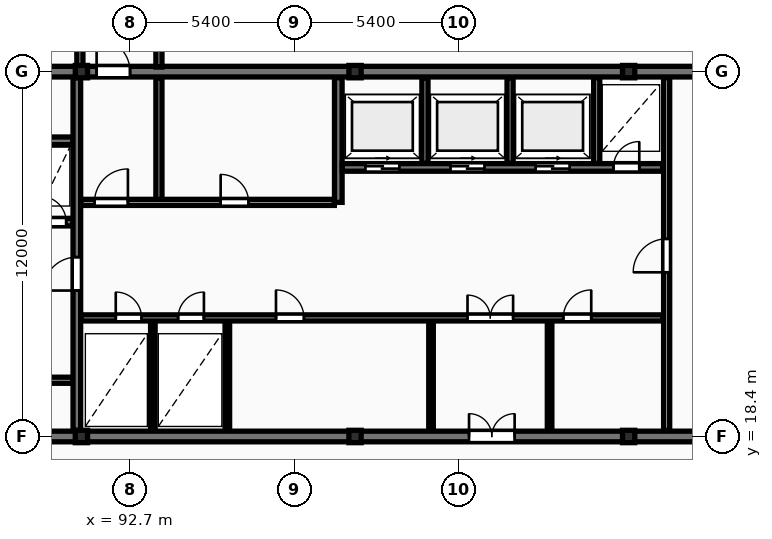
"""IFC4 building model, lengths in metres.
Left out: names, types, materials, properties, quantities, classifications, styles, units other than length and angle.
Written with IfcOpenShell. Run it as: python <this file> out.ifc"""

import sys

from ifc_helpers import new_model, si_unit, direction, frame, frame_2d, origin, origin_2d, place, context, subcontext, project, spatial, rectangle, i_section, extrude, element, fill, save


model = new_model("IFC4")
c1 = context("Model", 3, precision=1e-05, world=origin(), true_north=direction((0.0, 1.0)))
c2 = subcontext(c1, "Body", "Model", "MODEL_VIEW")
j1 = project(units=[si_unit("LENGTHUNIT", "METRE"), si_unit("PLANEANGLEUNIT", "RADIAN")], contexts=[c1])
p1 = place(None, origin())
s1 = spatial("IfcSite", under=j1, at=p1, CompositionType="ELEMENT")
p2 = place(p1, origin())
s2 = spatial("IfcBuilding", under=s1, at=p2, CompositionType="ELEMENT")
p3 = place(p2, frame((0.0, 0.0, 142.9)))
s3 = spatial("IfcBuildingStorey", under=s2, at=p3, CompositionType="ELEMENT", Elevation=142.9)
for number, where, z_axis, x_axis in (
    (1, (91.1, 18.4, 0.0), (0.0, 0.0, 1.0), (1.0, 0.0, 0.0)),
    (2, (91.1, 30.4, 0.0), (0.0, 0.0, 1.0), (1.0, 0.0, 0.0)),
    (3, (100.1, 18.4, 0.0), (0.0, 0.0, 1.0), (1.0, 0.0, 0.0)),
    (4, (100.1, 30.4, 0.0), (0.0, 0.0, 1.0), (1.0, 0.0, 0.0)),
    (5, (109.1, 18.4, 0.0), (0.0, 0.0, 1.0), (1.0, 0.0, 0.0)),
    (6, (109.1, 30.4, 0.0), (0.0, 0.0, 1.0), (1.0, 0.0, 0.0)),
):
    element("IfcColumn", number, at=place(p3, frame(where, z_axis=z_axis, x_axis=x_axis)), inside=s3, PredefinedType="COLUMN", context=c2, shape_type="SweptSolid", body=[
        extrude(i_section(OverallWidth=0.403, OverallDepth=0.406, WebThickness=0.027, FlangeThickness=0.043, FilletRadius=0.015, at=origin_2d()), origin(), (0.0, 0.0, 1.0), 3.6),
    ])
p4 = place(p3, frame((81.925, 30.4, 0.0), z_axis=(0.0, 0.0, 1.0), x_axis=(1.0, 0.0, 0.0)))
e7 = element("IfcWall", 7, at=p4, inside=s3, PredefinedType="SHEAR", context=c2, shape_type="SweptSolid", body=[
    extrude(rectangle(XDim=36.265, YDim=0.35, at=frame_2d((18.132, 0.0))), origin(), (0.0, 0.0, 1.0), 3.6),
])
p5 = place(p4, frame((9.675, 0.0, 0.0)))
e8 = element("IfcOpeningElement", 8, at=p5, cuts=e7, PredefinedType="OPENING", context=c2, shape_type="SweptSolid", body=[
    extrude(rectangle(XDim=1.1, YDim=2.1, at=frame_2d((0.55, 1.05))), frame((0.0, 0.185, 0.0), z_axis=(0.0, -1.0, 0.0), x_axis=(1.0, 0.0, 0.0)), (0.0, 0.0, 1.0), 0.37),
])
p6 = place(p3, frame((81.925, 18.4, 0.0), z_axis=(0.0, 0.0, 1.0), x_axis=(1.0, 0.0, 0.0)))
e9 = element("IfcWall", 9, at=p6, inside=s3, PredefinedType="SHEAR", context=c2, shape_type="SweptSolid", body=[
    extrude(rectangle(XDim=36.265, YDim=0.35, at=frame_2d((18.132, 0.0))), origin(), (0.0, 0.0, 1.0), 3.6),
])
p7 = place(p6, frame((5.675, 0.0, 0.0)))
e10 = element("IfcOpeningElement", 10, at=p7, cuts=e9, PredefinedType="OPENING", context=c2, shape_type="SweptSolid", body=[
    extrude(rectangle(XDim=1.0, YDim=2.15, at=frame_2d((0.5, 1.075))), frame((0.0, 0.185, 0.0), z_axis=(0.0, -1.0, 0.0), x_axis=(1.0, 0.0, 0.0)), (0.0, 0.0, 1.0), 0.37),
])
p8 = place(p6, frame((21.925, 0.0, 0.0)))
e11 = element("IfcOpeningElement", 11, at=p8, cuts=e9, PredefinedType="OPENING", context=c2, shape_type="SweptSolid", body=[
    extrude(rectangle(XDim=1.5, YDim=2.2, at=frame_2d((0.75, 1.1))), frame((0.0, 0.185, 0.0), z_axis=(0.0, -1.0, 0.0), x_axis=(1.0, 0.0, 0.0)), (0.0, 0.0, 1.0), 0.37),
])
p9 = place(p6, frame((29.875, 0.0, 0.0)))
e12 = element("IfcOpeningElement", 12, at=p9, cuts=e9, PredefinedType="OPENING", context=c2, shape_type="SweptSolid", body=[
    extrude(rectangle(XDim=1.0, YDim=2.15, at=frame_2d((0.5, 1.075))), frame((0.0, 0.185, 0.0), z_axis=(0.0, -1.0, 0.0), x_axis=(1.0, 0.0, 0.0)), (0.0, 0.0, 1.0), 0.37),
])
p10 = place(p3, frame((83.0, 28.125, 0.0), z_axis=(0.0, 0.0, 1.0), x_axis=(1.0, 0.0, 0.0)))
e13 = element("IfcWall", 13, at=p10, inside=s3, PredefinedType="SHEAR", context=c2, shape_type="SweptSolid", body=[
    extrude(rectangle(XDim=7.82, YDim=0.25, at=frame_2d((3.91, 0.0))), origin(), (0.0, 0.0, 1.0), 3.6),
])
p11 = place(p3, frame((86.5, 25.45, 0.0), z_axis=(0.0, 0.0, 1.0), x_axis=(1.0, 0.0, 0.0)))
e14 = element("IfcWall", 14, at=p11, inside=s3, PredefinedType="SHEAR", context=c2, shape_type="SweptSolid", body=[
    extrude(rectangle(XDim=4.32, YDim=0.25, at=frame_2d((2.16, 0.0))), origin(), (0.0, 0.0, 1.0), 3.6),
])
p12 = place(p11, frame((1.14, 0.0, 0.0)))
e15 = element("IfcOpeningElement", 15, at=p12, cuts=e14, PredefinedType="OPENING", context=c2, shape_type="SweptSolid", body=[
    extrude(rectangle(XDim=1.12, YDim=2.12, at=frame_2d((0.56, 1.06))), frame((0.0, 0.135, 0.0), z_axis=(0.0, -1.0, 0.0), x_axis=(1.0, 0.0, 0.0)), (0.0, 0.0, 1.0), 0.27),
])
p13 = place(p11, frame((3.25, 0.0, 0.0)))
e16 = element("IfcOpeningElement", 16, at=p13, cuts=e14, PredefinedType="OPENING", context=c2, shape_type="SweptSolid", body=[
    extrude(rectangle(XDim=0.85, YDim=2.05, at=frame_2d((0.425, 1.025))), frame((0.0, 0.135, 0.0), z_axis=(0.0, -1.0, 0.0), x_axis=(1.0, 0.0, 0.0)), (0.0, 0.0, 1.0), 0.27),
])
p14 = place(p3, frame((86.5, 20.25, 0.0), z_axis=(0.0, 0.0, 1.0), x_axis=(1.0, 0.0, 0.0)))
e17 = element("IfcWall", 17, at=p14, inside=s3, PredefinedType="PARTITIONING", context=c2, shape_type="SweptSolid", body=[
    extrude(rectangle(XDim=4.32, YDim=0.2, at=frame_2d((2.16, 0.0))), origin(), (0.0, 0.0, 1.0), 3.31),
])
p15 = place(p14, frame((1.4, 0.0, 0.0)))
e18 = element("IfcOpeningElement", 18, at=p15, cuts=e17, PredefinedType="OPENING", context=c2, shape_type="SweptSolid", body=[
    extrude(rectangle(XDim=1.1, YDim=2.1, at=frame_2d((0.55, 1.05))), frame((0.0, 0.11, 0.0), z_axis=(0.0, -1.0, 0.0), x_axis=(1.0, 0.0, 0.0)), (0.0, 0.0, 1.0), 0.22),
])
p16 = place(p3, frame((90.95, 18.6, 0.0), z_axis=(0.0, 0.0, 1.0), x_axis=(0.0, 1.0, 0.0)))
e19 = element("IfcWall", 19, at=p16, inside=s3, PredefinedType="SHEAR", context=c2, shape_type="SweptSolid", body=[
    extrude(rectangle(XDim=11.6, YDim=0.25, at=frame_2d((5.8, 0.0))), origin(), (0.0, 0.0, 1.0), 3.6),
])
p17 = place(p16, frame((4.6, 0.0, 0.0)))
e20 = element("IfcOpeningElement", 20, at=p17, cuts=e19, PredefinedType="OPENING", context=c2, shape_type="SweptSolid", body=[
    extrude(rectangle(XDim=1.1, YDim=2.1, at=frame_2d((0.55, 1.05))), frame((0.0, 0.135, 0.0), z_axis=(0.0, -1.0, 0.0), x_axis=(1.0, 0.0, 0.0)), (0.0, 0.0, 1.0), 0.27),
])
p18 = place(p3, frame((93.65, 26.1, 0.0), z_axis=(0.0, 0.0, 1.0), x_axis=(0.0, 1.0, 0.0)))
e21 = element("IfcWall", 21, at=p18, inside=s3, PredefinedType="PARTITIONING", context=c2, shape_type="SweptSolid", body=[
    extrude(rectangle(XDim=4.1, YDim=0.2, at=frame_2d((2.05, 0.0))), origin(), (0.0, 0.0, 1.0), 3.31),
])
p19 = place(p3, frame((91.08, 26.1, 0.0), z_axis=(0.0, 0.0, 1.0), x_axis=(1.0, 0.0, 0.0)))
e22 = element("IfcWall", 22, at=p19, inside=s3, PredefinedType="PARTITIONING", context=c2, shape_type="SweptSolid", body=[
    extrude(rectangle(XDim=8.34, YDim=0.2, at=frame_2d((4.17, 0.0))), origin(), (0.0, 0.0, 1.0), 3.31),
])
p20 = place(p19, frame((0.45, 0.0, 0.0)))
e23 = element("IfcOpeningElement", 23, at=p20, cuts=e22, PredefinedType="OPENING", context=c2, shape_type="SweptSolid", body=[
    extrude(rectangle(XDim=1.1, YDim=2.1, at=frame_2d((0.55, 1.05))), frame((0.0, 0.11, 0.0), z_axis=(0.0, -1.0, 0.0), x_axis=(1.0, 0.0, 0.0)), (0.0, 0.0, 1.0), 0.22),
])
p21 = place(p19, frame((4.6, 0.0, 0.0)))
e24 = element("IfcOpeningElement", 24, at=p21, cuts=e22, PredefinedType="OPENING", context=c2, shape_type="SweptSolid", body=[
    extrude(rectangle(XDim=0.92, YDim=2.08, at=frame_2d((0.46, 1.04))), frame((0.0, 0.11, 0.0), z_axis=(0.0, -1.0, 0.0), x_axis=(1.0, 0.0, 0.0)), (0.0, 0.0, 1.0), 0.22),
])
p22 = place(p3, frame((99.55, 26.1, 0.0), z_axis=(0.0, 0.0, 1.0), x_axis=(0.0, 1.0, 0.0)))
e25 = element("IfcWall", 25, at=p22, inside=s3, PredefinedType="SHEAR", context=c2, shape_type="SweptSolid", body=[
    extrude(rectangle(XDim=4.1, YDim=0.25, at=frame_2d((2.05, 0.0))), origin(), (0.0, 0.0, 1.0), 3.6),
])
for number, where, z_axis, x_axis in (
    (26, (102.4, 27.38, 0.0), (0.0, 0.0, 1.0), (0.0, 1.0, 0.0)),
    (27, (105.2, 27.38, 0.0), (0.0, 0.0, 1.0), (0.0, 1.0, 0.0)),
    (28, (108.05, 27.38, 0.0), (0.0, 0.0, 1.0), (0.0, 1.0, 0.0)),
):
    element("IfcWall", number, at=place(p3, frame(where, z_axis=z_axis, x_axis=x_axis)), inside=s3, PredefinedType="PARTITIONING", context=c2, shape_type="SweptSolid", body=[
        extrude(rectangle(XDim=2.82, YDim=0.2, at=frame_2d((1.41, 0.0))), origin(), (0.0, 0.0, 1.0), 3.31),
    ])
p23 = place(p3, frame((99.68, 27.25, 0.0), z_axis=(0.0, 0.0, 1.0), x_axis=(1.0, 0.0, 0.0)))
e29 = element("IfcWall", 29, at=p23, inside=s3, PredefinedType="SHEAR", context=c2, shape_type="SweptSolid", body=[
    extrude(rectangle(XDim=10.54, YDim=0.25, at=frame_2d((5.27, 0.0))), origin(), (0.0, 0.0, 1.0), 3.6),
])
p24 = place(p23, frame((0.76, 0.0, 0.0)))
e30 = element("IfcOpeningElement", 30, at=p24, cuts=e29, PredefinedType="OPENING", context=c2, shape_type="SweptSolid", body=[
    extrude(rectangle(XDim=1.12, YDim=2.12, at=frame_2d((0.56, 1.06))), frame((0.0, 0.135, 0.0), z_axis=(0.0, -1.0, 0.0), x_axis=(1.0, 0.0, 0.0)), (0.0, 0.0, 1.0), 0.27),
])
p25 = place(p23, frame((3.56, 0.0, 0.0)))
e31 = element("IfcOpeningElement", 31, at=p25, cuts=e29, PredefinedType="OPENING", context=c2, shape_type="SweptSolid", body=[
    extrude(rectangle(XDim=1.12, YDim=2.12, at=frame_2d((0.56, 1.06))), frame((0.0, 0.135, 0.0), z_axis=(0.0, -1.0, 0.0), x_axis=(1.0, 0.0, 0.0)), (0.0, 0.0, 1.0), 0.27),
])
p26 = place(p23, frame((6.36, 0.0, 0.0)))
e32 = element("IfcOpeningElement", 32, at=p26, cuts=e29, PredefinedType="OPENING", context=c2, shape_type="SweptSolid", body=[
    extrude(rectangle(XDim=1.12, YDim=2.12, at=frame_2d((0.56, 1.06))), frame((0.0, 0.135, 0.0), z_axis=(0.0, -1.0, 0.0), x_axis=(1.0, 0.0, 0.0)), (0.0, 0.0, 1.0), 0.27),
])
p27 = place(p23, frame((8.92, 0.0, 0.0)))
e33 = element("IfcOpeningElement", 33, at=p27, cuts=e29, PredefinedType="OPENING", context=c2, shape_type="SweptSolid", body=[
    extrude(rectangle(XDim=0.85, YDim=2.05, at=frame_2d((0.425, 1.025))), frame((0.0, 0.135, 0.0), z_axis=(0.0, -1.0, 0.0), x_axis=(1.0, 0.0, 0.0)), (0.0, 0.0, 1.0), 0.27),
])
for number, where, z_axis, x_axis in (
    (34, (93.45, 18.6, 0.0), (0.0, 0.0, 1.0), (0.0, 1.0, 0.0)),
    (35, (95.9, 18.6, 0.0), (0.0, 0.0, 1.0), (0.0, 1.0, 0.0)),
    (36, (102.6, 18.6, 0.0), (0.0, 0.0, 1.0), (0.0, 1.0, 0.0)),
    (37, (106.5, 18.6, 0.0), (0.0, 0.0, 1.0), (0.0, 1.0, 0.0)),
):
    element("IfcWall", number, at=place(p3, frame(where, z_axis=z_axis, x_axis=x_axis)), inside=s3, PredefinedType="PARTITIONING", context=c2, shape_type="SweptSolid", body=[
        extrude(rectangle(XDim=3.6, YDim=0.15, at=frame_2d((1.8, 0.0))), origin(), (0.0, 0.0, 1.0), 3.31),
    ])
p28 = place(p3, frame((91.08, 22.3, 0.0), z_axis=(0.0, 0.0, 1.0), x_axis=(1.0, 0.0, 0.0)))
e38 = element("IfcWall", 38, at=p28, inside=s3, PredefinedType="PARTITIONING", context=c2, shape_type="SweptSolid", body=[
    extrude(rectangle(XDim=19.14, YDim=0.2, at=frame_2d((9.57, 0.0))), origin(), (0.0, 0.0, 1.0), 3.31),
])
p29 = place(p28, frame((1.15, 0.0, 0.0)))
e39 = element("IfcOpeningElement", 39, at=p29, cuts=e38, PredefinedType="OPENING", context=c2, shape_type="SweptSolid", body=[
    extrude(rectangle(XDim=0.85, YDim=2.05, at=frame_2d((0.425, 1.025))), frame((0.0, 0.11, 0.0), z_axis=(0.0, -1.0, 0.0), x_axis=(1.0, 0.0, 0.0)), (0.0, 0.0, 1.0), 0.22),
])
p30 = place(p28, frame((3.2, 0.0, 0.0)))
e40 = element("IfcOpeningElement", 40, at=p30, cuts=e38, PredefinedType="OPENING", context=c2, shape_type="SweptSolid", body=[
    extrude(rectangle(XDim=0.85, YDim=2.05, at=frame_2d((0.425, 1.025))), frame((0.0, 0.11, 0.0), z_axis=(0.0, -1.0, 0.0), x_axis=(1.0, 0.0, 0.0)), (0.0, 0.0, 1.0), 0.22),
])
p31 = place(p28, frame((12.72, 0.0, 0.0)))
e41 = element("IfcOpeningElement", 41, at=p31, cuts=e38, PredefinedType="OPENING", context=c2, shape_type="SweptSolid", body=[
    extrude(rectangle(XDim=1.5, YDim=2.2, at=frame_2d((0.75, 1.1))), frame((0.0, 0.11, 0.0), z_axis=(0.0, -1.0, 0.0), x_axis=(1.0, 0.0, 0.0)), (0.0, 0.0, 1.0), 0.22),
])
p32 = place(p28, frame((6.42, 0.0, 0.0)))
e42 = element("IfcOpeningElement", 42, at=p32, cuts=e38, PredefinedType="OPENING", context=c2, shape_type="SweptSolid", body=[
    extrude(rectangle(XDim=0.92, YDim=2.08, at=frame_2d((0.46, 1.04))), frame((0.0, 0.11, 0.0), z_axis=(0.0, -1.0, 0.0), x_axis=(1.0, 0.0, 0.0)), (0.0, 0.0, 1.0), 0.22),
])
p33 = place(p28, frame((15.87, 0.0, 0.0)))
e43 = element("IfcOpeningElement", 43, at=p33, cuts=e38, PredefinedType="OPENING", context=c2, shape_type="SweptSolid", body=[
    extrude(rectangle(XDim=0.92, YDim=2.08, at=frame_2d((0.46, 1.04))), frame((0.0, 0.11, 0.0), z_axis=(0.0, -1.0, 0.0), x_axis=(1.0, 0.0, 0.0)), (0.0, 0.0, 1.0), 0.22),
])
p34 = place(p3, frame((110.35, 18.6, 0.0), z_axis=(0.0, 0.0, 1.0), x_axis=(0.0, 1.0, 0.0)))
e44 = element("IfcWall", 44, at=p34, inside=s3, PredefinedType="PARTITIONING", context=c2, shape_type="SweptSolid", body=[
    extrude(rectangle(XDim=11.6, YDim=0.2, at=frame_2d((5.8, 0.0))), origin(), (0.0, 0.0, 1.0), 3.31),
])
p35 = place(p34, frame((5.2, 0.0, 0.0)))
e45 = element("IfcOpeningElement", 45, at=p35, cuts=e44, PredefinedType="OPENING", context=c2, shape_type="SweptSolid", body=[
    extrude(rectangle(XDim=1.1, YDim=2.15, at=frame_2d((0.55, 1.075))), frame((0.0, 0.11, 0.0), z_axis=(0.0, -1.0, 0.0), x_axis=(1.0, 0.0, 0.0)), (0.0, 0.0, 1.0), 0.22),
])
p36 = place(p3, frame((91.05, 30.55, 0.0), z_axis=(0.0, 0.0, 1.0), x_axis=(0.0, 1.0, 0.0)))
e46 = element("IfcWall", 46, at=p36, inside=s3, PredefinedType="PARTITIONING", context=c2, shape_type="SweptSolid", body=[
    extrude(rectangle(XDim=2.2, YDim=0.2, at=frame_2d((1.1, 0.0))), origin(), (0.0, 0.0, 1.0), 3.31),
])
p37 = place(p3, frame((93.65, 30.55, 0.0), z_axis=(0.0, 0.0, 1.0), x_axis=(0.0, 1.0, 0.0)))
e47 = element("IfcWall", 47, at=p37, inside=s3, PredefinedType="PARTITIONING", context=c2, shape_type="SweptSolid", body=[
    extrude(rectangle(XDim=2.2, YDim=0.2, at=frame_2d((1.1, 0.0))), origin(), (0.0, 0.0, 1.0), 2.384),
])
p38 = place(p5, origin())
e48 = element("IfcDoor", 48, at=p38, inside=s3, OperationType="SINGLE_SWING_LEFT", PredefinedType="DOOR", context=c2, shape_type="SweptSolid", body=[
    extrude(rectangle(XDim=1.1, YDim=2.1, at=frame_2d((0.55, 1.05))), frame((0.0, 0.025, 0.0), z_axis=(0.0, -1.0, 0.0), x_axis=(1.0, 0.0, 0.0)), (0.0, 0.0, 1.0), 0.05),
])
fill(e8, e48)
p39 = place(p8, origin())
e49 = element("IfcDoor", 49, at=p39, inside=s3, OperationType="DOUBLE_DOOR_SINGLE_SWING", PredefinedType="DOOR", context=c2, shape_type="SweptSolid", body=[
    extrude(rectangle(XDim=1.5, YDim=2.2, at=frame_2d((0.75, 1.1))), frame((0.0, 0.025, 0.0), z_axis=(0.0, -1.0, 0.0), x_axis=(1.0, 0.0, 0.0)), (0.0, 0.0, 1.0), 0.05),
])
fill(e11, e49)
p40 = place(p13, origin())
e50 = element("IfcDoor", 50, at=p40, inside=s3, OperationType="SINGLE_SWING_LEFT", PredefinedType="DOOR", context=c2, shape_type="SweptSolid", body=[
    extrude(rectangle(XDim=0.85, YDim=2.05, at=frame_2d((0.425, 1.025))), frame((0.0, 0.025, 0.0), z_axis=(0.0, -1.0, 0.0), x_axis=(1.0, 0.0, 0.0)), (0.0, 0.0, 1.0), 0.05),
])
fill(e16, e50)
p41 = place(p17, origin())
e51 = element("IfcDoor", 51, at=p41, inside=s3, OperationType="SINGLE_SWING_LEFT", PredefinedType="DOOR", context=c2, shape_type="SweptSolid", body=[
    extrude(rectangle(XDim=1.1, YDim=2.1, at=frame_2d((0.55, 1.05))), frame((0.0, 0.025, 0.0), z_axis=(0.0, -1.0, 0.0), x_axis=(1.0, 0.0, 0.0)), (0.0, 0.0, 1.0), 0.05),
])
fill(e20, e51)
p42 = place(p20, origin())
e52 = element("IfcDoor", 52, at=p42, inside=s3, OperationType="SINGLE_SWING_RIGHT", PredefinedType="DOOR", context=c2, shape_type="SweptSolid", body=[
    extrude(rectangle(XDim=1.1, YDim=2.1, at=frame_2d((0.55, 1.05))), frame((0.0, 0.025, 0.0), z_axis=(0.0, -1.0, 0.0), x_axis=(1.0, 0.0, 0.0)), (0.0, 0.0, 1.0), 0.05),
])
fill(e23, e52)
p43 = place(p21, origin())
e53 = element("IfcDoor", 53, at=p43, inside=s3, OperationType="SINGLE_SWING_LEFT", PredefinedType="DOOR", context=c2, shape_type="SweptSolid", body=[
    extrude(rectangle(XDim=0.92, YDim=2.08, at=frame_2d((0.46, 1.04))), frame((0.0, 0.025, 0.0), z_axis=(0.0, -1.0, 0.0), x_axis=(1.0, 0.0, 0.0)), (0.0, 0.0, 1.0), 0.05),
])
fill(e24, e53)
p44 = place(p24, origin())
e54 = element("IfcDoor", 54, at=p44, inside=s3, OperationType="SLIDING_TO_RIGHT", PredefinedType="DOOR", context=c2, shape_type="SweptSolid", body=[
    extrude(rectangle(XDim=1.12, YDim=2.12, at=frame_2d((0.56, 1.06))), frame((0.0, 0.025, 0.0), z_axis=(0.0, -1.0, 0.0), x_axis=(1.0, 0.0, 0.0)), (0.0, 0.0, 1.0), 0.05),
])
fill(e30, e54)
p45 = place(p25, origin())
e55 = element("IfcDoor", 55, at=p45, inside=s3, OperationType="SLIDING_TO_RIGHT", PredefinedType="DOOR", context=c2, shape_type="SweptSolid", body=[
    extrude(rectangle(XDim=1.12, YDim=2.12, at=frame_2d((0.56, 1.06))), frame((0.0, 0.025, 0.0), z_axis=(0.0, -1.0, 0.0), x_axis=(1.0, 0.0, 0.0)), (0.0, 0.0, 1.0), 0.05),
])
fill(e31, e55)
p46 = place(p26, origin())
e56 = element("IfcDoor", 56, at=p46, inside=s3, OperationType="SLIDING_TO_RIGHT", PredefinedType="DOOR", context=c2, shape_type="SweptSolid", body=[
    extrude(rectangle(XDim=1.12, YDim=2.12, at=frame_2d((0.56, 1.06))), frame((0.0, 0.025, 0.0), z_axis=(0.0, -1.0, 0.0), x_axis=(1.0, 0.0, 0.0)), (0.0, 0.0, 1.0), 0.05),
])
fill(e32, e56)
p47 = place(p27, origin())
e57 = element("IfcDoor", 57, at=p47, inside=s3, OperationType="SINGLE_SWING_RIGHT", PredefinedType="DOOR", context=c2, shape_type="SweptSolid", body=[
    extrude(rectangle(XDim=0.85, YDim=2.05, at=frame_2d((0.425, 1.025))), frame((0.0, 0.025, 0.0), z_axis=(0.0, -1.0, 0.0), x_axis=(1.0, 0.0, 0.0)), (0.0, 0.0, 1.0), 0.05),
])
fill(e33, e57)
p48 = place(p29, origin())
e58 = element("IfcDoor", 58, at=p48, inside=s3, OperationType="SINGLE_SWING_LEFT", PredefinedType="DOOR", context=c2, shape_type="SweptSolid", body=[
    extrude(rectangle(XDim=0.85, YDim=2.05, at=frame_2d((0.425, 1.025))), frame((0.0, 0.025, 0.0), z_axis=(0.0, -1.0, 0.0), x_axis=(1.0, 0.0, 0.0)), (0.0, 0.0, 1.0), 0.05),
])
fill(e39, e58)
p49 = place(p30, origin())
e59 = element("IfcDoor", 59, at=p49, inside=s3, OperationType="SINGLE_SWING_RIGHT", PredefinedType="DOOR", context=c2, shape_type="SweptSolid", body=[
    extrude(rectangle(XDim=0.85, YDim=2.05, at=frame_2d((0.425, 1.025))), frame((0.0, 0.025, 0.0), z_axis=(0.0, -1.0, 0.0), x_axis=(1.0, 0.0, 0.0)), (0.0, 0.0, 1.0), 0.05),
])
fill(e40, e59)
p50 = place(p31, origin())
e60 = element("IfcDoor", 60, at=p50, inside=s3, OperationType="DOUBLE_DOOR_SINGLE_SWING", PredefinedType="DOOR", context=c2, shape_type="SweptSolid", body=[
    extrude(rectangle(XDim=1.5, YDim=2.2, at=frame_2d((0.75, 1.1))), frame((0.0, 0.025, 0.0), z_axis=(0.0, -1.0, 0.0), x_axis=(1.0, 0.0, 0.0)), (0.0, 0.0, 1.0), 0.05),
])
fill(e41, e60)
p51 = place(p32, origin())
e61 = element("IfcDoor", 61, at=p51, inside=s3, OperationType="SINGLE_SWING_LEFT", PredefinedType="DOOR", context=c2, shape_type="SweptSolid", body=[
    extrude(rectangle(XDim=0.92, YDim=2.08, at=frame_2d((0.46, 1.04))), frame((0.0, 0.025, 0.0), z_axis=(0.0, -1.0, 0.0), x_axis=(1.0, 0.0, 0.0)), (0.0, 0.0, 1.0), 0.05),
])
fill(e42, e61)
p52 = place(p33, origin())
e62 = element("IfcDoor", 62, at=p52, inside=s3, OperationType="SINGLE_SWING_RIGHT", PredefinedType="DOOR", context=c2, shape_type="SweptSolid", body=[
    extrude(rectangle(XDim=0.92, YDim=2.08, at=frame_2d((0.46, 1.04))), frame((0.0, 0.025, 0.0), z_axis=(0.0, -1.0, 0.0), x_axis=(1.0, 0.0, 0.0)), (0.0, 0.0, 1.0), 0.05),
])
fill(e43, e62)
p53 = place(p35, origin())
e63 = element("IfcDoor", 63, at=p53, inside=s3, OperationType="SINGLE_SWING_LEFT", PredefinedType="DOOR", context=c2, shape_type="SweptSolid", body=[
    extrude(rectangle(XDim=1.1, YDim=2.15, at=frame_2d((0.55, 1.075))), frame((0.0, 0.025, 0.0), z_axis=(0.0, -1.0, 0.0), x_axis=(1.0, 0.0, 0.0)), (0.0, 0.0, 1.0), 0.05),
])
fill(e45, e63)
save(model, sys.argv[1])
